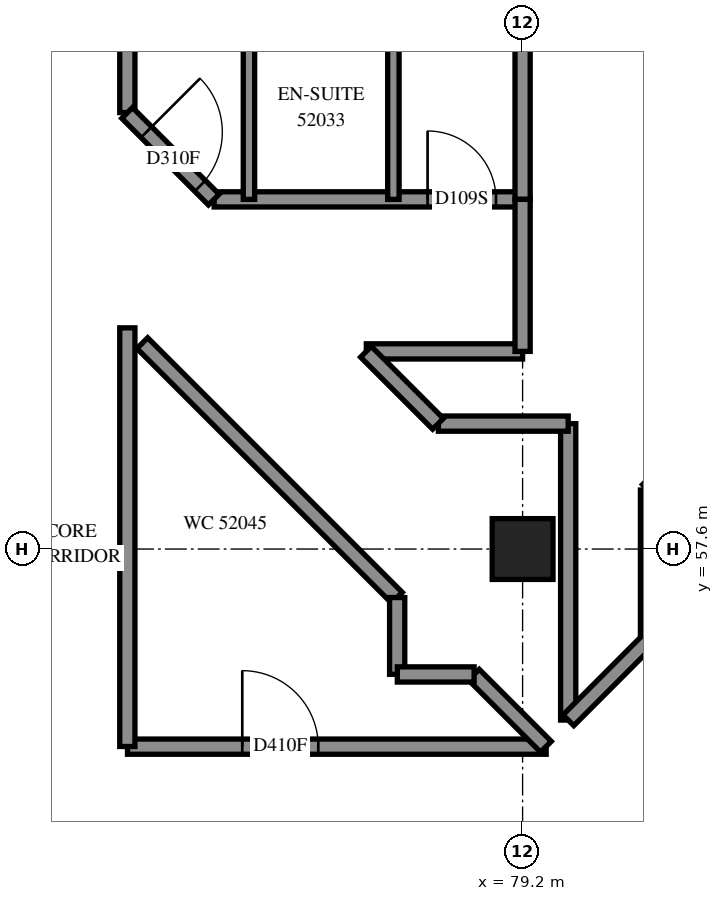
"""IFC4 building model, lengths in metres.
Left out: names, types, materials, properties, quantities, classifications, styles, units other than length and angle.
Written with IfcOpenShell. Run it as: python <this file> out.ifc"""

import sys

from ifc_helpers import new_model, si_unit, direction, frame, frame_2d, origin, origin_2d, place, context, subcontext, project, spatial, rectangle, extrude, element, fill, save


model = new_model("IFC4")
c1 = context("Model", 3, precision=1e-05, world=origin(), true_north=direction((0.0, 1.0)))
c2 = subcontext(c1, "Body", "Model", "MODEL_VIEW")
j1 = project(units=[si_unit("LENGTHUNIT", "METRE"), si_unit("PLANEANGLEUNIT", "RADIAN")], contexts=[c1])
p1 = place(None, origin())
s1 = spatial("IfcSite", under=j1, at=p1, CompositionType="ELEMENT")
p2 = place(p1, origin())
s2 = spatial("IfcBuilding", under=s1, at=p2, CompositionType="ELEMENT")
p3 = place(p2, frame((0.0, 0.0, 193.0)))
s3 = spatial("IfcBuildingStorey", under=s2, at=p3, CompositionType="ELEMENT", Elevation=193.0)
p4 = place(p3, frame((79.2, 57.6, 0.0), z_axis=(0.0, 0.0, 1.0), x_axis=(1.0, 0.0, 0.0)))
e1 = element("IfcColumn", 1, at=p4, inside=s3, PredefinedType="COLUMN", context=c2, shape_type="SweptSolid", body=[
    extrude(rectangle(XDim=0.8, YDim=0.8, at=origin_2d()), origin(), (0.0, 0.0, 1.0), 3.1),
])
p5 = place(p3, frame((76.478, 49.267, -0.3), z_axis=(0.0, 0.0, 1.0), x_axis=(0.7071067812, 0.7071067812, 0.0)))
e2 = element("IfcWall", 2, at=p5, inside=s3, PredefinedType="SHEAR", context=c2, shape_type="SweptSolid", body=[
    extrude(rectangle(XDim=14.4, YDim=0.5, at=frame_2d((7.2, 0.0))), origin(), (0.0, 0.0, 1.0), 2.7),
])
p6 = place(p5, frame((4.55, 0.0, 0.3)))
e3 = element("IfcOpeningElement", 3, at=p6, cuts=e2, PredefinedType="OPENING", context=c2, shape_type="SweptSolid", body=[
    extrude(rectangle(XDim=1.1, YDim=2.1, at=frame_2d((0.55, 1.05))), frame((0.0, 0.26, 0.0), z_axis=(0.0, -1.0, 0.0), x_axis=(1.0, 0.0, 0.0)), (0.0, 0.0, 1.0), 0.52),
])
p7 = place(p5, frame((11.35, 0.0, 0.3)))
e4 = element("IfcOpeningElement", 4, at=p7, cuts=e2, PredefinedType="OPENING", context=c2, shape_type="SweptSolid", body=[
    extrude(rectangle(XDim=1.1, YDim=2.1, at=frame_2d((0.55, 1.05))), frame((0.0, 0.26, 0.0), z_axis=(0.0, -1.0, 0.0), x_axis=(1.0, 0.0, 0.0)), (0.0, 0.0, 1.0), 0.52),
])
p8 = place(p3, frame((80.849, 58.377, 0.0), z_axis=(0.0, 0.0, 1.0), x_axis=(0.7071067812, 0.7071067812, 0.0)))
e5 = element("IfcWall", 5, at=p8, inside=s3, PredefinedType="PARTITIONING", context=c2, shape_type="SweptSolid", body=[
    extrude(rectangle(XDim=9.333, YDim=0.2, at=frame_2d((4.666, 0.0))), origin(), (0.0, 0.0, 1.0), 3.1),
])
p9 = place(p3, frame((74.002, 55.0, 0.0), z_axis=(0.0, 0.0, 1.0), x_axis=(1.0, 0.0, 0.0)))
e6 = element("IfcWall", 6, at=p9, inside=s3, PredefinedType="PARTITIONING", context=c2, shape_type="SweptSolid", body=[
    extrude(rectangle(XDim=5.508, YDim=0.2, at=frame_2d((2.754, 0.0))), origin(), (0.0, 0.0, 1.0), 3.1),
])
p10 = place(p9, frame((1.51, 0.0, 0.0)))
e7 = element("IfcOpeningElement", 7, at=p10, cuts=e6, PredefinedType="OPENING", context=c2, shape_type="SweptSolid", body=[
    extrude(rectangle(XDim=1.0, YDim=2.1, at=frame_2d((0.5, 1.05))), frame((0.0, 0.11, 0.0), z_axis=(0.0, -1.0, 0.0), x_axis=(1.0, 0.0, 0.0)), (0.0, 0.0, 1.0), 0.22),
])
p11 = place(p3, frame((74.0, 55.002, 0.0), z_axis=(0.0, 0.0, 1.0), x_axis=(0.0, 1.0, 0.0)))
e8 = element("IfcWall", 8, at=p11, inside=s3, PredefinedType="PARTITIONING", context=c2, shape_type="SweptSolid", body=[
    extrude(rectangle(XDim=5.508, YDim=0.2, at=frame_2d((2.754, 0.0))), origin(), (0.0, 0.0, 1.0), 3.1),
])
p12 = place(p3, frame((74.197, 60.309, 0.0), z_axis=(0.0, 0.0, 1.0), x_axis=(0.7071067812, -0.7071067812, 0.0)))
e9 = element("IfcWall", 9, at=p12, inside=s3, PredefinedType="PARTITIONING", context=c2, shape_type="SweptSolid", body=[
    extrude(rectangle(XDim=4.738, YDim=0.2, at=frame_2d((2.369, 0.0))), origin(), (0.0, 0.0, 1.0), 3.1),
])
p13 = place(p3, frame((75.142, 62.2, 0.0), z_axis=(0.0, 0.0, 1.0), x_axis=(1.0, 0.0, 0.0)))
e10 = element("IfcWall", 10, at=p13, inside=s3, PredefinedType="PARTITIONING", context=c2, shape_type="SweptSolid", body=[
    extrude(rectangle(XDim=4.058, YDim=0.2, at=frame_2d((2.029, 0.0))), origin(), (0.0, 0.0, 1.0), 3.1),
])
p14 = place(p13, frame((2.808, 0.0, 0.0)))
e11 = element("IfcOpeningElement", 11, at=p14, cuts=e10, PredefinedType="OPENING", context=c2, shape_type="SweptSolid", body=[
    extrude(rectangle(XDim=0.9, YDim=2.1, at=frame_2d((0.45, 1.05))), frame((0.0, 0.11, 0.0), z_axis=(0.0, -1.0, 0.0), x_axis=(1.0, 0.0, 0.0)), (0.0, 0.0, 1.0), 0.22),
])
p15 = place(p3, frame((79.8, 55.35, 0.0), z_axis=(0.0, 0.0, 1.0), x_axis=(0.0, 1.0, 0.0)))
e12 = element("IfcWall", 12, at=p15, inside=s3, PredefinedType="PARTITIONING", context=c2, shape_type="SweptSolid", body=[
    extrude(rectangle(XDim=3.9, YDim=0.2, at=frame_2d((1.95, 0.0))), origin(), (0.0, 0.0, 1.0), 3.1),
])
p16 = place(p3, frame((74.0, 63.342, 0.0), z_axis=(0.0, 0.0, 1.0), x_axis=(0.0, 1.0, 0.0)))
e13 = element("IfcWall", 13, at=p16, inside=s3, PredefinedType="PARTITIONING", context=c2, shape_type="SweptSolid", body=[
    extrude(rectangle(XDim=3.458, YDim=0.2, at=frame_2d((1.729, 0.0))), origin(), (0.0, 0.0, 1.0), 3.1),
])
for number, where, z_axis, x_axis in (
    (14, (75.6, 62.2, 0.0), (0.0, 0.0, 1.0), (0.0, 1.0, 0.0)),
    (15, (77.5, 62.2, 0.0), (0.0, 0.0, 1.0), (0.0, 1.0, 0.0)),
):
    element("IfcWall", number, at=place(p3, frame(where, z_axis=z_axis, x_axis=x_axis)), inside=s3, PredefinedType="PARTITIONING", context=c2, shape_type="SweptSolid", body=[
        extrude(rectangle(XDim=2.4, YDim=0.15, at=frame_2d((1.2, 0.0))), origin(), (0.0, 0.0, 1.0), 3.1),
    ])
p17 = place(p3, frame((79.2, 62.2, 0.0), z_axis=(0.0, 0.0, 1.0), x_axis=(0.0, 1.0, 0.0)))
e16 = element("IfcWall", 16, at=p17, inside=s3, PredefinedType="PARTITIONING", context=c2, shape_type="SweptSolid", body=[
    extrude(rectangle(XDim=2.2, YDim=0.2, at=frame_2d((1.1, 0.0))), origin(), (0.0, 0.0, 1.0), 3.1),
])
p18 = place(p3, frame((77.144, 60.2, 0.0), z_axis=(0.0, 0.0, 1.0), x_axis=(1.0, 0.0, 0.0)))
e17 = element("IfcWall", 17, at=p18, inside=s3, PredefinedType="PARTITIONING", context=c2, shape_type="SweptSolid", body=[
    extrude(rectangle(XDim=2.056, YDim=0.2, at=frame_2d((1.028, 0.0))), origin(), (0.0, 0.0, 1.0), 3.1),
])
p19 = place(p3, frame((79.2, 60.2, 0.0), z_axis=(0.0, 0.0, 1.0), x_axis=(0.0, 1.0, 0.0)))
e18 = element("IfcWall", 18, at=p19, inside=s3, PredefinedType="PARTITIONING", context=c2, shape_type="SweptSolid", body=[
    extrude(rectangle(XDim=2.0, YDim=0.2, at=frame_2d((1.0, 0.0))), origin(), (0.0, 0.0, 1.0), 3.1),
])
p20 = place(p3, frame((80.85, 56.49, 0.0), z_axis=(0.0, 0.0, 1.0), x_axis=(0.0, 1.0, 0.0)))
e19 = element("IfcWall", 19, at=p20, inside=s3, PredefinedType="PARTITIONING", context=c2, shape_type="SweptSolid", body=[
    extrude(rectangle(XDim=1.886, YDim=0.2, at=frame_2d((0.943, 0.0))), origin(), (0.0, 0.0, 1.0), 3.1),
])
p21 = place(p3, frame((78.092, 59.25, 0.0), z_axis=(0.0, 0.0, 1.0), x_axis=(1.0, 0.0, 0.0)))
e20 = element("IfcWall", 20, at=p21, inside=s3, PredefinedType="PARTITIONING", context=c2, shape_type="SweptSolid", body=[
    extrude(rectangle(XDim=1.708, YDim=0.2, at=frame_2d((0.854, 0.0))), origin(), (0.0, 0.0, 1.0), 3.1),
])
p22 = place(p3, frame((73.997, 63.337, 0.0), z_axis=(0.0, 0.0, 1.0), x_axis=(0.7071067812, -0.7071067812, 0.0)))
e21 = element("IfcWall", 21, at=p22, inside=s3, PredefinedType="PARTITIONING", context=c2, shape_type="SweptSolid", body=[
    extrude(rectangle(XDim=1.612, YDim=0.2, at=frame_2d((0.806, 0.0))), origin(), (0.0, 0.0, 1.0), 3.1),
])
p23 = place(p22, frame((0.357, 0.0, 0.0)))
e22 = element("IfcOpeningElement", 22, at=p23, cuts=e21, PredefinedType="OPENING", context=c2, shape_type="SweptSolid", body=[
    extrude(rectangle(XDim=1.0, YDim=2.1, at=frame_2d((0.5, 1.05))), frame((0.0, 0.11, 0.0), z_axis=(0.0, -1.0, 0.0), x_axis=(1.0, 0.0, 0.0)), (0.0, 0.0, 1.0), 0.22),
])
p24 = place(p3, frame((79.803, 55.347, 0.0), z_axis=(0.0, 0.0, 1.0), x_axis=(0.706460727, 0.7077522457, 0.0)))
e23 = element("IfcWall", 23, at=p24, inside=s3, PredefinedType="PARTITIONING", context=c2, shape_type="SweptSolid", body=[
    extrude(rectangle(XDim=1.549, YDim=0.2, at=frame_2d((0.774, 0.0))), origin(), (0.0, 0.0, 1.0), 3.1),
])
for number, where, z_axis, x_axis in (
    (24, (78.559, 55.947, 0.0), (0.0, 0.0, 1.0), (0.707, -0.707, 0.0)),
    (25, (77.139, 60.195, 0.0), (0.0, 0.0, 1.0), (0.707, -0.707, 0.0)),
):
    element("IfcWall", number, at=place(p3, frame(where, z_axis=z_axis, x_axis=x_axis)), inside=s3, PredefinedType="PARTITIONING", context=c2, shape_type="SweptSolid", body=[
        extrude(rectangle(XDim=1.341, YDim=0.2, at=frame_2d((0.67, 0.0))), origin(), (0.0, 0.0, 1.0), 3.1),
    ])
for number, where, z_axis, x_axis in (
    (26, (77.55, 55.952, 0.0), (0.0, 0.0, 1.0), (0.0, 1.0, 0.0)),
    (27, (77.552, 55.95, 0.0), (0.0, 0.0, 1.0), (1.0, 0.0, 0.0)),
):
    element("IfcWall", number, at=place(p3, frame(where, z_axis=z_axis, x_axis=x_axis)), inside=s3, PredefinedType="PARTITIONING", context=c2, shape_type="SweptSolid", body=[
        extrude(rectangle(XDim=1.01, YDim=0.2, at=frame_2d((0.505, 0.0))), origin(), (0.0, 0.0, 1.0), 3.1),
    ])
p25 = place(p23, origin())
e28 = element("IfcDoor", 28, at=p25, inside=s3, OperationType="SINGLE_SWING_RIGHT", PredefinedType="DOOR", context=c2, shape_type="SweptSolid", body=[
    extrude(rectangle(XDim=1.0, YDim=2.1, at=frame_2d((0.5, 1.05))), frame((0.0, 0.025, 0.0), z_axis=(0.0, -1.0, 0.0), x_axis=(1.0, 0.0, 0.0)), (0.0, 0.0, 1.0), 0.05),
])
fill(e22, e28)
p26 = place(p14, origin())
e29 = element("IfcDoor", 29, at=p26, inside=s3, OperationType="SINGLE_SWING_LEFT", PredefinedType="DOOR", context=c2, shape_type="SweptSolid", body=[
    extrude(rectangle(XDim=0.9, YDim=2.1, at=frame_2d((0.45, 1.05))), frame((0.0, 0.025, 0.0), z_axis=(0.0, -1.0, 0.0), x_axis=(1.0, 0.0, 0.0)), (0.0, 0.0, 1.0), 0.05),
])
fill(e11, e29)
p27 = place(p10, origin())
e30 = element("IfcDoor", 30, at=p27, inside=s3, OperationType="SINGLE_SWING_LEFT", PredefinedType="DOOR", context=c2, shape_type="SweptSolid", body=[
    extrude(rectangle(XDim=1.0, YDim=2.1, at=frame_2d((0.5, 1.05))), frame((0.0, 0.025, 0.0), z_axis=(0.0, -1.0, 0.0), x_axis=(1.0, 0.0, 0.0)), (0.0, 0.0, 1.0), 0.05),
])
fill(e7, e30)
save(model, sys.argv[1])
